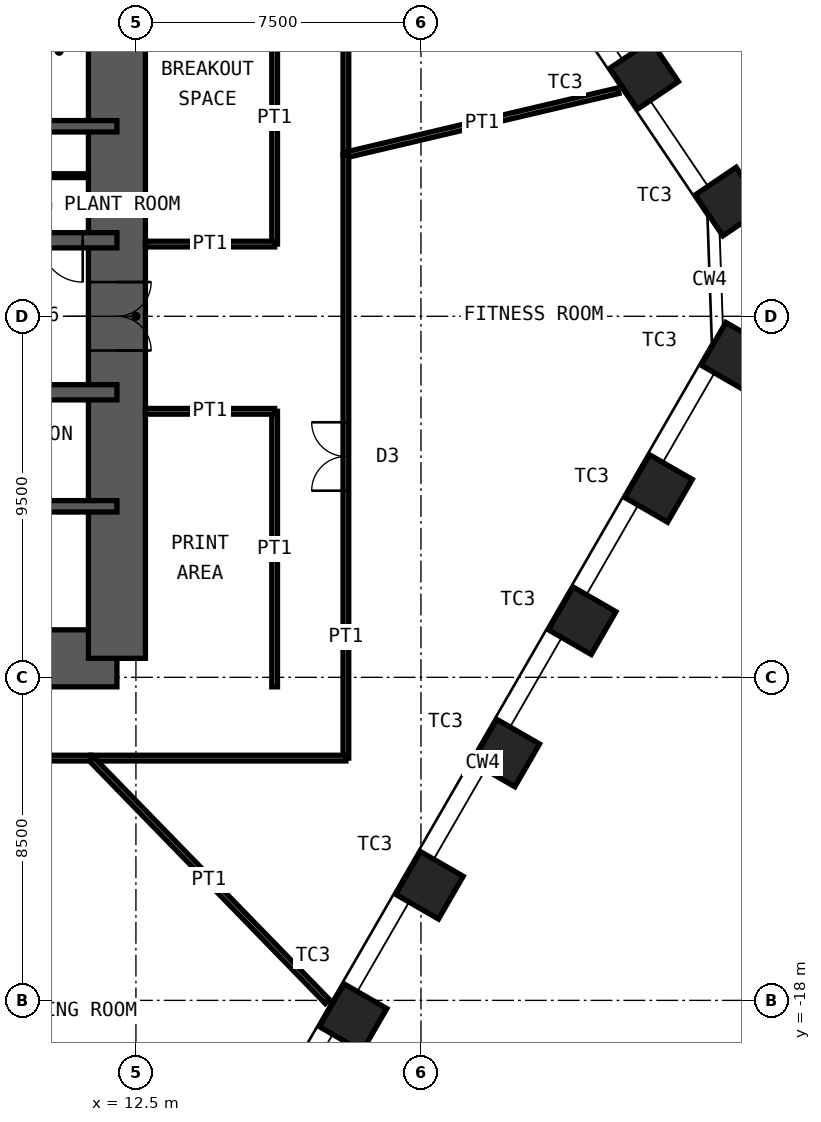
"""IFC4 building model, lengths in metres.
Left out: names, types, materials, properties, quantities, classifications, styles, units other than length and angle.
Written with IfcOpenShell. Run it as: python <this file> out.ifc"""

import sys

from ifc_helpers import new_model, si_unit, direction, frame, frame_2d, origin, origin_2d, place, context, subcontext, project, spatial, rectangle, hollow_rectangle, extrude, element, fill, save


model = new_model("IFC4")
c1 = context("Model", 3, precision=1e-05, world=origin(), true_north=direction((0.0, 1.0)))
c2 = subcontext(c1, "Body", "Model", "MODEL_VIEW")
j1 = project(units=[si_unit("LENGTHUNIT", "METRE"), si_unit("PLANEANGLEUNIT", "RADIAN")], contexts=[c1])
p1 = place(None, origin())
s1 = spatial("IfcSite", under=j1, at=p1, CompositionType="ELEMENT")
p2 = place(p1, origin())
s2 = spatial("IfcBuilding", under=s1, at=p2, CompositionType="ELEMENT")
p3 = place(p2, frame((0.0, 0.0, 132.4)))
s3 = spatial("IfcBuildingStorey", under=s2, at=p3, CompositionType="ELEMENT", Elevation=132.4)
for number, where, z_axis, x_axis in (
    (1, (25.872, 6.351, 0.0), (0.0, 0.0, 1.0), (-0.559, 0.829, 0.0)),
    (2, (28.119, 3.019, 0.0), (0.0, 0.0, 1.0), (-0.559, 0.829, 0.0)),
    (3, (28.261, -1.05, 0.0), (0.0, 0.0, 1.0), (0.5, 0.866, 0.0)),
    (4, (26.252, -4.53, 0.0), (0.0, 0.0, 1.0), (0.5, 0.866, 0.0)),
    (5, (24.242, -8.011, 0.0), (0.0, 0.0, 1.0), (0.5, 0.866, 0.0)),
    (6, (22.233, -11.491, 0.0), (0.0, 0.0, 1.0), (0.5, 0.866, 0.0)),
    (7, (20.223, -14.972, 0.0), (0.0, 0.0, 1.0), (0.5, 0.866, 0.0)),
    (8, (18.214, -18.453, 0.0), (0.0, 0.0, 1.0), (0.5, 0.866, 0.0)),
):
    element("IfcColumn", number, at=place(p3, frame(where, z_axis=z_axis, x_axis=x_axis)), inside=s3, PredefinedType="COLUMN", context=c2, shape_type="SweptSolid", body=[
        extrude(hollow_rectangle(XDim=1.3, YDim=1.3, WallThickness=0.1, at=origin_2d()), origin(), (0.0, 0.0, 1.0), 4.2),
    ])
p4 = place(p3, frame((-12.0, -9.0, 0.0), z_axis=(0.0, 0.0, 1.0), x_axis=(1.0, 0.0, 0.0)))
e9 = element("IfcWall", 9, at=p4, inside=s3, PredefinedType="SHEAR", context=c2, shape_type="SweptSolid", body=[
    extrude(rectangle(XDim=24.0, YDim=1.5, at=frame_2d((12.0, 0.0))), origin(), (0.0, 0.0, 1.0), 4.2),
])
p5 = place(p4, frame((1.35, 0.0, 0.0)))
e10 = element("IfcOpeningElement", 10, at=p5, cuts=e9, PredefinedType="OPENING", context=c2, shape_type="SweptSolid", body=[
    extrude(rectangle(XDim=1.0, YDim=2.1, at=frame_2d((0.5, 1.05))), frame((0.0, 0.76, 0.0), z_axis=(0.0, -1.0, 0.0), x_axis=(1.0, 0.0, 0.0)), (0.0, 0.0, 1.0), 1.52),
])
p6 = place(p4, frame((5.325, 0.0, 0.0)))
e11 = element("IfcOpeningElement", 11, at=p6, cuts=e9, PredefinedType="OPENING", context=c2, shape_type="SweptSolid", body=[
    extrude(rectangle(XDim=1.15, YDim=2.1, at=frame_2d((0.575, 1.05))), frame((0.0, 0.76, 0.0), z_axis=(0.0, -1.0, 0.0), x_axis=(1.0, 0.0, 0.0)), (0.0, 0.0, 1.0), 1.52),
])
p7 = place(p4, frame((12.6, 0.0, 0.0)))
e12 = element("IfcOpeningElement", 12, at=p7, cuts=e9, PredefinedType="OPENING", context=c2, shape_type="SweptSolid", body=[
    extrude(rectangle(XDim=1.0, YDim=2.1, at=frame_2d((0.5, 1.05))), frame((0.0, 0.76, 0.0), z_axis=(0.0, -1.0, 0.0), x_axis=(1.0, 0.0, 0.0)), (0.0, 0.0, 1.0), 1.52),
])
p8 = place(p3, frame((12.0, -9.0, 0.0), z_axis=(0.0, 0.0, 1.0), x_axis=(0.0, 1.0, 0.0)))
e13 = element("IfcWall", 13, at=p8, inside=s3, PredefinedType="SHEAR", context=c2, shape_type="SweptSolid", body=[
    extrude(rectangle(XDim=18.0, YDim=1.5, at=frame_2d((9.0, 0.0))), origin(), (0.0, 0.0, 1.0), 4.2),
])
p9 = place(p8, frame((8.1, 0.0, 0.0)))
e14 = element("IfcOpeningElement", 14, at=p9, cuts=e13, PredefinedType="OPENING", context=c2, shape_type="SweptSolid", body=[
    extrude(rectangle(XDim=1.8, YDim=2.1, at=frame_2d((0.9, 1.05))), frame((0.0, 0.76, 0.0), z_axis=(0.0, -1.0, 0.0), x_axis=(1.0, 0.0, 0.0)), (0.0, 0.0, 1.0), 1.52),
])
p10 = place(p3, frame((-12.0, 5.0, 0.0), z_axis=(0.0, 0.0, 1.0), x_axis=(1.0, 0.0, 0.0)))
e15 = element("IfcWall", 15, at=p10, inside=s3, PredefinedType="SHEAR", context=c2, shape_type="SweptSolid", body=[
    extrude(rectangle(XDim=24.0, YDim=0.3, at=frame_2d((12.0, 0.0))), origin(), (0.0, 0.0, 1.0), 4.2),
])
p11 = place(p3, frame((-12.0, 2.0, 0.0), z_axis=(0.0, 0.0, 1.0), x_axis=(1.0, 0.0, 0.0)))
e16 = element("IfcWall", 16, at=p11, inside=s3, PredefinedType="SHEAR", context=c2, shape_type="SweptSolid", body=[
    extrude(rectangle(XDim=24.0, YDim=0.4, at=frame_2d((12.0, 0.0))), origin(), (0.0, 0.0, 1.0), 4.2),
])
p12 = place(p11, frame((2.4, 0.0, 0.0)))
e17 = element("IfcOpeningElement", 17, at=p12, cuts=e16, PredefinedType="OPENING", context=c2, shape_type="SweptSolid", body=[
    extrude(rectangle(XDim=1.1, YDim=2.1, at=frame_2d((0.55, 1.05))), frame((0.0, 0.21, 0.0), z_axis=(0.0, -1.0, 0.0), x_axis=(1.0, 0.0, 0.0)), (0.0, 0.0, 1.0), 0.42),
])
p13 = place(p11, frame((22.0, 0.0, 0.0)))
e18 = element("IfcOpeningElement", 18, at=p13, cuts=e16, PredefinedType="OPENING", context=c2, shape_type="SweptSolid", body=[
    extrude(rectangle(XDim=1.1, YDim=2.1, at=frame_2d((0.55, 1.05))), frame((0.0, 0.21, 0.0), z_axis=(0.0, -1.0, 0.0), x_axis=(1.0, 0.0, 0.0)), (0.0, 0.0, 1.0), 0.42),
])
p14 = place(p11, frame((10.15, 0.0, 0.0)))
e19 = element("IfcOpeningElement", 19, at=p14, cuts=e16, PredefinedType="OPENING", context=c2, shape_type="SweptSolid", body=[
    extrude(rectangle(XDim=1.0, YDim=2.1, at=frame_2d((0.5, 1.05))), frame((0.0, 0.21, 0.0), z_axis=(0.0, -1.0, 0.0), x_axis=(1.0, 0.0, 0.0)), (0.0, 0.0, 1.0), 0.42),
])
p15 = place(p11, frame((6.9, 0.0, 0.0)))
e20 = element("IfcOpeningElement", 20, at=p15, cuts=e16, PredefinedType="OPENING", context=c2, shape_type="SweptSolid", body=[
    extrude(rectangle(XDim=1.0, YDim=2.1, at=frame_2d((0.5, 1.05))), frame((0.0, 0.21, 0.0), z_axis=(0.0, -1.0, 0.0), x_axis=(1.0, 0.0, 0.0)), (0.0, 0.0, 1.0), 0.42),
])
p16 = place(p11, frame((13.35, 0.0, 0.0)))
e21 = element("IfcOpeningElement", 21, at=p16, cuts=e16, PredefinedType="OPENING", context=c2, shape_type="SweptSolid", body=[
    extrude(rectangle(XDim=1.1, YDim=2.4, at=frame_2d((0.55, 1.2))), frame((0.0, 0.21, 0.0), z_axis=(0.0, -1.0, 0.0), x_axis=(1.0, 0.0, 0.0)), (0.0, 0.0, 1.0), 0.42),
])
p17 = place(p11, frame((16.15, 0.0, 0.0)))
e22 = element("IfcOpeningElement", 22, at=p17, cuts=e16, PredefinedType="OPENING", context=c2, shape_type="SweptSolid", body=[
    extrude(rectangle(XDim=1.1, YDim=2.4, at=frame_2d((0.55, 1.2))), frame((0.0, 0.21, 0.0), z_axis=(0.0, -1.0, 0.0), x_axis=(1.0, 0.0, 0.0)), (0.0, 0.0, 1.0), 0.42),
])
p18 = place(p11, frame((18.95, 0.0, 0.0)))
e23 = element("IfcOpeningElement", 23, at=p18, cuts=e16, PredefinedType="OPENING", context=c2, shape_type="SweptSolid", body=[
    extrude(rectangle(XDim=1.1, YDim=2.4, at=frame_2d((0.55, 1.2))), frame((0.0, 0.21, 0.0), z_axis=(0.0, -1.0, 0.0), x_axis=(1.0, 0.0, 0.0)), (0.0, 0.0, 1.0), 0.42),
])
p19 = place(p3, frame((-12.0, -2.0, 0.0), z_axis=(0.0, 0.0, 1.0), x_axis=(1.0, 0.0, 0.0)))
e24 = element("IfcWall", 24, at=p19, inside=s3, PredefinedType="SHEAR", context=c2, shape_type="SweptSolid", body=[
    extrude(rectangle(XDim=24.0, YDim=0.4, at=frame_2d((12.0, 0.0))), origin(), (0.0, 0.0, 1.0), 4.2),
])
p20 = place(p19, frame((1.1, 0.0, 0.0)))
e25 = element("IfcOpeningElement", 25, at=p20, cuts=e24, PredefinedType="OPENING", context=c2, shape_type="SweptSolid", body=[
    extrude(rectangle(XDim=1.1, YDim=2.1, at=frame_2d((0.55, 1.05))), frame((0.0, 0.21, 0.0), z_axis=(0.0, -1.0, 0.0), x_axis=(1.0, 0.0, 0.0)), (0.0, 0.0, 1.0), 0.42),
])
p21 = place(p19, frame((13.55, 0.0, 0.0)))
e26 = element("IfcOpeningElement", 26, at=p21, cuts=e24, PredefinedType="OPENING", context=c2, shape_type="SweptSolid", body=[
    extrude(rectangle(XDim=1.1, YDim=2.1, at=frame_2d((0.55, 1.05))), frame((0.0, 0.21, 0.0), z_axis=(0.0, -1.0, 0.0), x_axis=(1.0, 0.0, 0.0)), (0.0, 0.0, 1.0), 0.42),
])
p22 = place(p19, frame((20.7, 0.0, 0.0)))
e27 = element("IfcOpeningElement", 27, at=p22, cuts=e24, PredefinedType="OPENING", context=c2, shape_type="SweptSolid", body=[
    extrude(rectangle(XDim=1.1, YDim=2.1, at=frame_2d((0.55, 1.05))), frame((0.0, 0.21, 0.0), z_axis=(0.0, -1.0, 0.0), x_axis=(1.0, 0.0, 0.0)), (0.0, 0.0, 1.0), 0.42),
])
p23 = place(p19, frame((4.0, 0.0, 0.0)))
e28 = element("IfcOpeningElement", 28, at=p23, cuts=e24, PredefinedType="OPENING", context=c2, shape_type="SweptSolid", body=[
    extrude(rectangle(XDim=1.0, YDim=2.1, at=frame_2d((0.5, 1.05))), frame((0.0, 0.21, 0.0), z_axis=(0.0, -1.0, 0.0), x_axis=(1.0, 0.0, 0.0)), (0.0, 0.0, 1.0), 0.42),
])
p24 = place(p3, frame((-12.0, -5.0, 0.0), z_axis=(0.0, 0.0, 1.0), x_axis=(1.0, 0.0, 0.0)))
e29 = element("IfcWall", 29, at=p24, inside=s3, PredefinedType="SHEAR", context=c2, shape_type="SweptSolid", body=[
    extrude(rectangle(XDim=24.0, YDim=0.3, at=frame_2d((12.0, 0.0))), origin(), (0.0, 0.0, 1.0), 4.2),
])
p25 = place(p3, frame((9.05, 3.7, 0.0), z_axis=(0.0, 0.0, 1.0), x_axis=(1.0, 0.0, 0.0)))
e30 = element("IfcWall", 30, at=p25, inside=s3, PredefinedType="PARTITIONING", context=c2, shape_type="SweptSolid", body=[
    extrude(rectangle(XDim=2.2, YDim=0.1, at=frame_2d((1.1, 0.0))), origin(), (0.0, 0.0, 1.0), 3.98),
])
p26 = place(p25, frame((0.1, 0.0, 0.0)))
e31 = element("IfcOpeningElement", 31, at=p26, cuts=e30, PredefinedType="OPENING", context=c2, shape_type="SweptSolid", body=[
    extrude(rectangle(XDim=1.0, YDim=2.4, at=frame_2d((0.5, 1.2))), frame((0.0, 0.06, 0.0), z_axis=(0.0, -1.0, 0.0), x_axis=(1.0, 0.0, 0.0)), (0.0, 0.0, 1.0), 0.12),
])
p27 = place(p3, frame((18.025, 10.941, 0.0), z_axis=(0.0, 0.0, 1.0), x_axis=(0.0, -1.0, 0.0)))
e32 = element("IfcWall", 32, at=p27, inside=s3, PredefinedType="PARTITIONING", context=c2, shape_type="SweptSolid", body=[
    extrude(rectangle(XDim=6.694, YDim=0.15, at=frame_2d((3.347, 0.0))), origin(), (0.0, 0.0, 1.0), 4.03),
])
p28 = place(p27, frame((2.847, 0.0, 0.0)))
e33 = element("IfcOpeningElement", 33, at=p28, cuts=e32, PredefinedType="OPENING", context=c2, shape_type="SweptSolid", body=[
    extrude(rectangle(XDim=1.0, YDim=2.4, at=frame_2d((0.5, 1.2))), frame((0.0, 0.085, 0.0), z_axis=(0.0, -1.0, 0.0), x_axis=(1.0, 0.0, 0.0)), (0.0, 0.0, 1.0), 0.17),
])
p29 = place(p3, frame((25.194, 5.936, 0.0), z_axis=(0.0, 0.0, 1.0), x_axis=(-0.973348007689, -0.22933306767, 0.0)))
e34 = element("IfcWall", 34, at=p29, inside=s3, PredefinedType="PARTITIONING", context=c2, shape_type="SweptSolid", body=[
    extrude(rectangle(XDim=7.366, YDim=0.15, at=frame_2d((3.683, 0.0))), origin(), (0.0, 0.0, 1.0), 4.03),
])
p30 = place(p3, frame((18.025, 4.247, 0.0), z_axis=(0.0, 0.0, 1.0), x_axis=(0.0, -1.0, 0.0)))
e35 = element("IfcWall", 35, at=p30, inside=s3, PredefinedType="PARTITIONING", context=c2, shape_type="SweptSolid", body=[
    extrude(rectangle(XDim=15.872, YDim=0.15, at=frame_2d((7.936, 0.0))), origin(), (0.0, 0.0, 1.0), 4.03),
])
p31 = place(p30, frame((7.036, 0.0, 0.0)))
e36 = element("IfcOpeningElement", 36, at=p31, cuts=e35, PredefinedType="OPENING", context=c2, shape_type="SweptSolid", body=[
    extrude(rectangle(XDim=1.8, YDim=2.4, at=frame_2d((0.9, 1.2))), frame((0.0, 0.085, 0.0), z_axis=(0.0, -1.0, 0.0), x_axis=(1.0, 0.0, 0.0)), (0.0, 0.0, 1.0), 0.17),
])
p32 = place(p3, frame((18.025, -11.625, 0.0), z_axis=(0.0, 0.0, 1.0), x_axis=(-1.0, 0.0, 0.0)))
e37 = element("IfcWall", 37, at=p32, inside=s3, PredefinedType="PARTITIONING", context=c2, shape_type="SweptSolid", body=[
    extrude(rectangle(XDim=6.718, YDim=0.15, at=frame_2d((3.359, 0.0))), origin(), (0.0, 0.0, 1.0), 4.03),
])
p33 = place(p3, frame((17.538, -18.031, 0.0), z_axis=(0.0, 0.0, 1.0), x_axis=(-0.697230918085, 0.716846599257, 0.0)))
e38 = element("IfcWall", 38, at=p33, inside=s3, PredefinedType="PARTITIONING", context=c2, shape_type="SweptSolid", body=[
    extrude(rectangle(XDim=8.936, YDim=0.15, at=frame_2d((4.468, 0.0))), origin(), (0.0, 0.0, 1.0), 3.33),
])
p34 = place(p3, frame((11.307, -11.625, 0.0), z_axis=(0.0, 0.0, 1.0), x_axis=(-1.0, 0.0, 0.0)))
e39 = element("IfcWall", 39, at=p34, inside=s3, PredefinedType="PARTITIONING", context=c2, shape_type="SweptSolid", body=[
    extrude(rectangle(XDim=9.111, YDim=0.15, at=frame_2d((4.555, 0.0))), origin(), (0.0, 0.0, 1.0), 4.03),
])
p35 = place(p34, frame((3.655, 0.0, 0.0)))
e40 = element("IfcOpeningElement", 40, at=p35, cuts=e39, PredefinedType="OPENING", context=c2, shape_type="SweptSolid", body=[
    extrude(rectangle(XDim=1.8, YDim=2.4, at=frame_2d((0.9, 1.2))), frame((0.0, 0.085, 0.0), z_axis=(0.0, -1.0, 0.0), x_axis=(1.0, 0.0, 0.0)), (0.0, 0.0, 1.0), 0.17),
])
p36 = place(p3, frame((16.15, 1.9, 0.0), z_axis=(0.0, 0.0, 1.0), x_axis=(0.0, 1.0, 0.0)))
e41 = element("IfcWall", 41, at=p36, inside=s3, PredefinedType="PARTITIONING", context=c2, shape_type="SweptSolid", body=[
    extrude(rectangle(XDim=7.85, YDim=0.15, at=frame_2d((3.925, 0.0))), origin(), (0.0, 0.0, 1.0), 4.03),
])
p37 = place(p3, frame((12.75, 1.9, 0.0), z_axis=(0.0, 0.0, 1.0), x_axis=(1.0, 0.0, 0.0)))
e42 = element("IfcWall", 42, at=p37, inside=s3, PredefinedType="PARTITIONING", context=c2, shape_type="SweptSolid", body=[
    extrude(rectangle(XDim=3.4, YDim=0.15, at=frame_2d((1.7, 0.0))), origin(), (0.0, 0.0, 1.0), 2.93),
])
p38 = place(p3, frame((16.15, -9.75, 0.0), z_axis=(0.0, 0.0, 1.0), x_axis=(0.0, 1.0, 0.0)))
e43 = element("IfcWall", 43, at=p38, inside=s3, PredefinedType="PARTITIONING", context=c2, shape_type="SweptSolid", body=[
    extrude(rectangle(XDim=7.25, YDim=0.15, at=frame_2d((3.625, 0.0))), origin(), (0.0, 0.0, 1.0), 4.03),
])
p39 = place(p3, frame((12.75, -2.5, 0.0), z_axis=(0.0, 0.0, 1.0), x_axis=(1.0, 0.0, 0.0)))
e44 = element("IfcWall", 44, at=p39, inside=s3, PredefinedType="PARTITIONING", context=c2, shape_type="SweptSolid", body=[
    extrude(rectangle(XDim=3.4, YDim=0.15, at=frame_2d((1.7, 0.0))), origin(), (0.0, 0.0, 1.0), 3.33),
])
p40 = place(p13, origin())
e45 = element("IfcDoor", 45, at=p40, inside=s3, OperationType="SINGLE_SWING_RIGHT", PredefinedType="DOOR", context=c2, shape_type="SweptSolid", body=[
    extrude(rectangle(XDim=1.1, YDim=2.1, at=frame_2d((0.55, 1.05))), frame((0.0, 0.025, 0.0), z_axis=(0.0, -1.0, 0.0), x_axis=(1.0, 0.0, 0.0)), (0.0, 0.0, 1.0), 0.05),
])
fill(e18, e45)
p41 = place(p9, origin())
e46 = element("IfcDoor", 46, at=p41, inside=s3, OperationType="DOUBLE_DOOR_DOUBLE_SWING", PredefinedType="DOOR", context=c2, shape_type="SweptSolid", body=[
    extrude(rectangle(XDim=1.8, YDim=2.1, at=frame_2d((0.9, 1.05))), frame((0.0, 0.025, 0.0), z_axis=(0.0, -1.0, 0.0), x_axis=(1.0, 0.0, 0.0)), (0.0, 0.0, 1.0), 0.05),
])
fill(e14, e46)
p42 = place(p31, origin())
e47 = element("IfcDoor", 47, at=p42, inside=s3, OperationType="DOUBLE_DOOR_DOUBLE_SWING", PredefinedType="DOOR", context=c2, shape_type="SweptSolid", body=[
    extrude(rectangle(XDim=1.8, YDim=2.4, at=frame_2d((0.9, 1.2))), frame((0.0, 0.025, 0.0), z_axis=(0.0, -1.0, 0.0), x_axis=(1.0, 0.0, 0.0)), (0.0, 0.0, 1.0), 0.05),
])
fill(e36, e47)
save(model, sys.argv[1])
